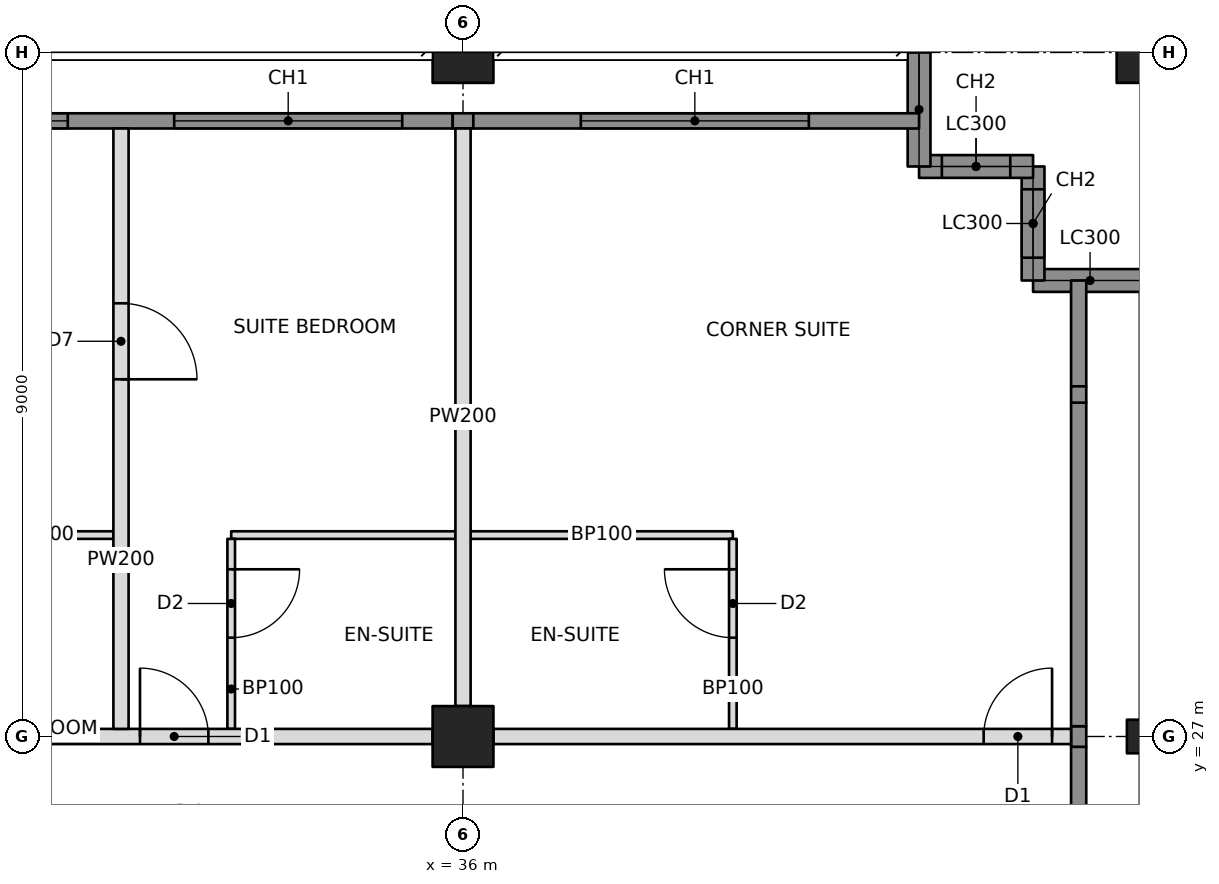
"""IFC4 building model, lengths in metres.
Left out: names, types, materials, properties, quantities, classifications, styles, units other than length and angle.
Written with IfcOpenShell. Run it as: python <this file> out.ifc"""

import sys

from ifc_helpers import new_model, si_unit, direction, frame, frame_2d, origin, origin_2d, place, context, subcontext, project, spatial, rectangle, hollow_rectangle, i_section, extrude, element, fill, save


model = new_model("IFC4")
c1 = context("Model", 3, precision=1e-05, world=origin(), true_north=direction((0.0, 1.0)))
c2 = subcontext(c1, "Body", "Model", "MODEL_VIEW")
j1 = project(units=[si_unit("LENGTHUNIT", "METRE"), si_unit("PLANEANGLEUNIT", "RADIAN")], contexts=[c1])
p1 = place(None, origin())
s1 = spatial("IfcSite", under=j1, at=p1, CompositionType="ELEMENT")
p2 = place(p1, origin())
s2 = spatial("IfcBuilding", under=s1, at=p2, CompositionType="ELEMENT")
p3 = place(p2, frame((0.0, 0.0, 148.6)))
s3 = spatial("IfcBuildingStorey", under=s2, at=p3, CompositionType="ELEMENT", Elevation=148.6)
p4 = place(p3, frame((36.0, 27.0, 0.0), z_axis=(0.0, 0.0, 1.0), x_axis=(1.0, 0.0, 0.0)))
e1 = element("IfcColumn", 1, at=p4, inside=s3, PredefinedType="COLUMN", context=c2, shape_type="SweptSolid", body=[
    extrude(hollow_rectangle(XDim=0.8, YDim=0.8, WallThickness=0.07, at=origin_2d()), origin(), (0.0, 0.0, 1.0), 3.4),
])
p5 = place(p3, frame((36.0, 36.0, 0.0), z_axis=(0.0, 0.0, 1.0), x_axis=(1.0, 0.0, 0.0)))
e2 = element("IfcColumn", 2, at=p5, inside=s3, PredefinedType="COLUMN", context=c2, shape_type="SweptSolid", body=[
    extrude(hollow_rectangle(XDim=0.8, YDim=0.8, WallThickness=0.06, at=origin_2d()), origin(), (0.0, 0.0, 1.0), 3.4),
])
p6 = place(p3, frame((45.0, 27.0, 0.0), z_axis=(0.0, 0.0, 1.0), x_axis=(0.0, 1.0, 0.0)))
e3 = element("IfcColumn", 3, at=p6, inside=s3, PredefinedType="COLUMN", context=c2, shape_type="SweptSolid", body=[
    extrude(i_section(OverallWidth=0.442, OverallDepth=0.531, WebThickness=0.066, FlangeThickness=0.106, at=origin_2d()), origin(), (0.0, 0.0, 1.0), 3.4),
])
p7 = place(p3, frame((45.0, 36.0, 0.0), z_axis=(0.0, 0.0, 1.0), x_axis=(1.0, 0.0, 0.0)))
e4 = element("IfcColumn", 4, at=p7, inside=s3, PredefinedType="COLUMN", context=c2, shape_type="SweptSolid", body=[
    extrude(hollow_rectangle(XDim=0.8, YDim=0.8, WallThickness=0.06, at=origin_2d()), origin(), (0.0, 0.0, 1.0), 3.4),
])
p8 = place(p3, frame((45.0, 33.0, 0.0), z_axis=(0.0, 0.0, 1.0), x_axis=(-1.0, 0.0, 0.0)))
e5 = element("IfcWall", 5, at=p8, inside=s3, PredefinedType="SOLIDWALL", context=c2, shape_type="SweptSolid", body=[
    extrude(rectangle(XDim=1.5, YDim=0.3, at=frame_2d((0.75, 0.0))), origin(), (0.0, 0.0, 1.0), 2.42),
])
p9 = place(p3, frame((43.5, 33.0, 0.0), z_axis=(0.0, 0.0, 1.0), x_axis=(0.0, 1.0, 0.0)))
e6 = element("IfcWall", 6, at=p9, inside=s3, PredefinedType="SOLIDWALL", context=c2, shape_type="SweptSolid", body=[
    extrude(rectangle(XDim=1.5, YDim=0.3, at=frame_2d((0.75, 0.0))), origin(), (0.0, 0.0, 1.0), 3.2),
])
p10 = place(p9, frame((0.3, 0.0, 0.6)))
e7 = element("IfcOpeningElement", 7, at=p10, cuts=e6, PredefinedType="OPENING", context=c2, shape_type="SweptSolid", body=[
    extrude(rectangle(XDim=0.9, YDim=2.2, at=frame_2d((0.45, 1.1))), frame((0.0, 0.16, 0.0), z_axis=(0.0, -1.0, 0.0), x_axis=(1.0, 0.0, 0.0)), (0.0, 0.0, 1.0), 0.32),
])
p11 = place(p3, frame((43.5, 34.5, 0.0), z_axis=(0.0, 0.0, 1.0), x_axis=(-1.0, 0.0, 0.0)))
e8 = element("IfcWall", 8, at=p11, inside=s3, PredefinedType="SOLIDWALL", context=c2, shape_type="SweptSolid", body=[
    extrude(rectangle(XDim=1.5, YDim=0.3, at=frame_2d((0.75, 0.0))), origin(), (0.0, 0.0, 1.0), 3.2),
])
p12 = place(p11, frame((0.3, 0.0, 0.6)))
e9 = element("IfcOpeningElement", 9, at=p12, cuts=e8, PredefinedType="OPENING", context=c2, shape_type="SweptSolid", body=[
    extrude(rectangle(XDim=0.9, YDim=2.2, at=frame_2d((0.45, 1.1))), frame((0.0, 0.16, 0.0), z_axis=(0.0, -1.0, 0.0), x_axis=(1.0, 0.0, 0.0)), (0.0, 0.0, 1.0), 0.32),
])
p13 = place(p3, frame((42.0, 34.5, 0.0), z_axis=(0.0, 0.0, 1.0), x_axis=(0.0, 1.0, 0.0)))
e10 = element("IfcWall", 10, at=p13, inside=s3, PredefinedType="SOLIDWALL", context=c2, shape_type="SweptSolid", body=[
    extrude(rectangle(XDim=1.5, YDim=0.3, at=frame_2d((0.75, 0.0))), origin(), (0.0, 0.0, 1.0), 2.42),
])
p14 = place(p3, frame((27.4, 27.0, 0.0), z_axis=(0.0, 0.0, 1.0), x_axis=(1.0, 0.0, 0.0)))
e11 = element("IfcWall", 11, at=p14, inside=s3, PredefinedType="PARTITIONING", context=c2, shape_type="SweptSolid", body=[
    extrude(rectangle(XDim=8.2, YDim=0.2, at=frame_2d((4.1, 0.0))), origin(), (0.0, 0.0, 1.0), 2.405),
])
p15 = place(p14, frame((4.35, 0.0, 0.0)))
e12 = element("IfcOpeningElement", 12, at=p15, cuts=e11, PredefinedType="OPENING", context=c2, shape_type="SweptSolid", body=[
    extrude(rectangle(XDim=0.9, YDim=2.1, at=frame_2d((0.45, 1.05))), frame((0.0, 0.11, 0.0), z_axis=(0.0, -1.0, 0.0), x_axis=(1.0, 0.0, 0.0)), (0.0, 0.0, 1.0), 0.22),
])
p16 = place(p3, frame((36.4, 27.0, 0.0), z_axis=(0.0, 0.0, 1.0), x_axis=(1.0, 0.0, 0.0)))
e13 = element("IfcWall", 13, at=p16, inside=s3, PredefinedType="PARTITIONING", context=c2, shape_type="SweptSolid", body=[
    extrude(rectangle(XDim=7.6, YDim=0.2, at=frame_2d((3.8, 0.0))), origin(), (0.0, 0.0, 1.0), 2.438),
])
p17 = place(p16, frame((6.45, 0.0, 0.0)))
e14 = element("IfcOpeningElement", 14, at=p17, cuts=e13, PredefinedType="OPENING", context=c2, shape_type="SweptSolid", body=[
    extrude(rectangle(XDim=0.9, YDim=2.1, at=frame_2d((0.45, 1.05))), frame((0.0, 0.11, 0.0), z_axis=(0.0, -1.0, 0.0), x_axis=(1.0, 0.0, 0.0)), (0.0, 0.0, 1.0), 0.22),
])
p18 = place(p3, frame((31.5, 27.1, 0.0), z_axis=(0.0, 0.0, 1.0), x_axis=(0.0, 1.0, 0.0)))
e15 = element("IfcWall", 15, at=p18, inside=s3, PredefinedType="PARTITIONING", context=c2, shape_type="SweptSolid", body=[
    extrude(rectangle(XDim=7.9, YDim=0.2, at=frame_2d((3.95, 0.0))), origin(), (0.0, 0.0, 1.0), 2.404),
])
p19 = place(p18, frame((4.6, 0.0, 0.0)))
e16 = element("IfcOpeningElement", 16, at=p19, cuts=e15, PredefinedType="OPENING", context=c2, shape_type="SweptSolid", body=[
    extrude(rectangle(XDim=1.0, YDim=2.1, at=frame_2d((0.5, 1.05))), frame((0.0, 0.11, 0.0), z_axis=(0.0, -1.0, 0.0), x_axis=(1.0, 0.0, 0.0)), (0.0, 0.0, 1.0), 0.22),
])
p20 = place(p3, frame((36.0, 27.4, 0.0), z_axis=(0.0, 0.0, 1.0), x_axis=(0.0, 1.0, 0.0)))
e17 = element("IfcWall", 17, at=p20, inside=s3, PredefinedType="PARTITIONING", context=c2, shape_type="SweptSolid", body=[
    extrude(rectangle(XDim=7.6, YDim=0.2, at=frame_2d((3.8, 0.0))), origin(), (0.0, 0.0, 1.0), 2.438),
])
p21 = place(p3, frame((29.55, 29.65, 0.0), z_axis=(0.0, 0.0, 1.0), x_axis=(1.0, 0.0, 0.0)))
e18 = element("IfcWall", 18, at=p21, inside=s3, PredefinedType="PARTITIONING", context=c2, shape_type="SweptSolid", body=[
    extrude(rectangle(XDim=1.85, YDim=0.1, at=frame_2d((0.925, 0.0))), origin(), (0.0, 0.0, 1.0), 3.2),
])
p22 = place(p3, frame((32.95, 29.65, 0.0), z_axis=(0.0, 0.0, 1.0), x_axis=(1.0, 0.0, 0.0)))
e19 = element("IfcWall", 19, at=p22, inside=s3, PredefinedType="PARTITIONING", context=c2, shape_type="SweptSolid", body=[
    extrude(rectangle(XDim=2.95, YDim=0.1, at=frame_2d((1.475, 0.0))), origin(), (0.0, 0.0, 1.0), 2.438),
])
p23 = place(p3, frame((32.95, 27.1, 0.0), z_axis=(0.0, 0.0, 1.0), x_axis=(0.0, 1.0, 0.0)))
e20 = element("IfcWall", 20, at=p23, inside=s3, PredefinedType="PARTITIONING", context=c2, shape_type="SweptSolid", body=[
    extrude(rectangle(XDim=2.5, YDim=0.1, at=frame_2d((1.25, 0.0))), origin(), (0.0, 0.0, 1.0), 2.404),
])
p24 = place(p23, frame((1.2, 0.0, 0.0)))
e21 = element("IfcOpeningElement", 21, at=p24, cuts=e20, PredefinedType="OPENING", context=c2, shape_type="SweptSolid", body=[
    extrude(rectangle(XDim=0.9, YDim=2.1, at=frame_2d((0.45, 1.05))), frame((0.0, 0.06, 0.0), z_axis=(0.0, -1.0, 0.0), x_axis=(1.0, 0.0, 0.0)), (0.0, 0.0, 1.0), 0.12),
])
p25 = place(p3, frame((36.1, 29.65, 0.0), z_axis=(0.0, 0.0, 1.0), x_axis=(1.0, 0.0, 0.0)))
e22 = element("IfcWall", 22, at=p25, inside=s3, PredefinedType="PARTITIONING", context=c2, shape_type="SweptSolid", body=[
    extrude(rectangle(XDim=3.45, YDim=0.1, at=frame_2d((1.725, 0.0))), origin(), (0.0, 0.0, 1.0), 2.438),
])
p26 = place(p3, frame((39.55, 27.1, 0.0), z_axis=(0.0, 0.0, 1.0), x_axis=(0.0, 1.0, 0.0)))
e23 = element("IfcWall", 23, at=p26, inside=s3, PredefinedType="PARTITIONING", context=c2, shape_type="SweptSolid", body=[
    extrude(rectangle(XDim=2.5, YDim=0.1, at=frame_2d((1.25, 0.0))), origin(), (0.0, 0.0, 1.0), 2.438),
])
p27 = place(p26, frame((1.2, 0.0, 0.0)))
e24 = element("IfcOpeningElement", 24, at=p27, cuts=e23, PredefinedType="OPENING", context=c2, shape_type="SweptSolid", body=[
    extrude(rectangle(XDim=0.9, YDim=2.1, at=frame_2d((0.45, 1.05))), frame((0.0, 0.06, 0.0), z_axis=(0.0, -1.0, 0.0), x_axis=(1.0, 0.0, 0.0)), (0.0, 0.0, 1.0), 0.12),
])
p28 = place(p3, frame((27.194, 35.1, 0.0), z_axis=(0.0, 0.0, 1.0), x_axis=(1.0, 0.0, 0.0)))
e25 = element("IfcWall", 25, at=p28, inside=s3, PredefinedType="SOLIDWALL", context=c2, shape_type="SweptSolid", body=[
    extrude(rectangle(XDim=8.671, YDim=0.2, at=frame_2d((4.335, 0.0))), origin(), (0.0, 0.0, 1.0), 3.2),
])
p29 = place(p28, frame((0.606, 0.0, 0.6)))
e26 = element("IfcOpeningElement", 26, at=p29, cuts=e25, PredefinedType="OPENING", context=c2, shape_type="SweptSolid", body=[
    extrude(rectangle(XDim=3.0, YDim=2.2, at=frame_2d((1.5, 1.1))), frame((0.0, 0.11, 0.0), z_axis=(0.0, -1.0, 0.0), x_axis=(1.0, 0.0, 0.0)), (0.0, 0.0, 1.0), 0.22),
])
p30 = place(p28, frame((5.006, 0.0, 0.6)))
e27 = element("IfcOpeningElement", 27, at=p30, cuts=e25, PredefinedType="OPENING", context=c2, shape_type="SweptSolid", body=[
    extrude(rectangle(XDim=3.0, YDim=2.2, at=frame_2d((1.5, 1.1))), frame((0.0, 0.11, 0.0), z_axis=(0.0, -1.0, 0.0), x_axis=(1.0, 0.0, 0.0)), (0.0, 0.0, 1.0), 0.22),
])
p31 = place(p3, frame((35.865, 35.1, 0.0), z_axis=(0.0, 0.0, 1.0), x_axis=(1.0, 0.0, 0.0)))
e28 = element("IfcWall", 28, at=p31, inside=s3, PredefinedType="SOLIDWALL", context=c2, shape_type="SweptSolid", body=[
    extrude(rectangle(XDim=0.271, YDim=0.2, at=frame_2d((0.135, 0.0))), origin(), (0.0, 0.0, 1.0), 2.438),
])
p32 = place(p3, frame((36.135, 35.1, 0.0), z_axis=(0.0, 0.0, 1.0), x_axis=(1.0, 0.0, 0.0)))
e29 = element("IfcWall", 29, at=p32, inside=s3, PredefinedType="SOLIDWALL", context=c2, shape_type="SweptSolid", body=[
    extrude(rectangle(XDim=5.865, YDim=0.2, at=frame_2d((2.932, 0.0))), origin(), (0.0, 0.0, 1.0), 3.2),
])
p33 = place(p32, frame((1.415, 0.0, 0.6)))
e30 = element("IfcOpeningElement", 30, at=p33, cuts=e29, PredefinedType="OPENING", context=c2, shape_type="SweptSolid", body=[
    extrude(rectangle(XDim=3.0, YDim=2.2, at=frame_2d((1.5, 1.1))), frame((0.0, 0.11, 0.0), z_axis=(0.0, -1.0, 0.0), x_axis=(1.0, 0.0, 0.0)), (0.0, 0.0, 1.0), 0.22),
])
p34 = place(p3, frame((44.1, 18.194, 0.0), z_axis=(0.0, 0.0, 1.0), x_axis=(0.0, 1.0, 0.0)))
e31 = element("IfcWall", 31, at=p34, inside=s3, PredefinedType="SOLIDWALL", context=c2, shape_type="SweptSolid", body=[
    extrude(rectangle(XDim=8.671, YDim=0.2, at=frame_2d((4.335, 0.0))), origin(), (0.0, 0.0, 1.0), 3.2),
])
p35 = place(p34, frame((0.156, 0.0, 0.6)))
e32 = element("IfcOpeningElement", 32, at=p35, cuts=e31, PredefinedType="OPENING", context=c2, shape_type="SweptSolid", body=[
    extrude(rectangle(XDim=3.0, YDim=2.2, at=frame_2d((1.5, 1.1))), frame((0.0, 0.11, 0.0), z_axis=(0.0, -1.0, 0.0), x_axis=(1.0, 0.0, 0.0)), (0.0, 0.0, 1.0), 0.22),
])
p36 = place(p34, frame((3.656, 0.0, 0.6)))
e33 = element("IfcOpeningElement", 33, at=p36, cuts=e31, PredefinedType="OPENING", context=c2, shape_type="SweptSolid", body=[
    extrude(rectangle(XDim=3.0, YDim=2.2, at=frame_2d((1.5, 1.1))), frame((0.0, 0.11, 0.0), z_axis=(0.0, -1.0, 0.0), x_axis=(1.0, 0.0, 0.0)), (0.0, 0.0, 1.0), 0.22),
])
p37 = place(p3, frame((44.1, 26.865, 0.0), z_axis=(0.0, 0.0, 1.0), x_axis=(0.0, 1.0, 0.0)))
e34 = element("IfcWall", 34, at=p37, inside=s3, PredefinedType="SOLIDWALL", context=c2, shape_type="SweptSolid", body=[
    extrude(rectangle(XDim=0.271, YDim=0.2, at=frame_2d((0.135, 0.0))), origin(), (0.0, 0.0, 1.0), 2.438),
])
p38 = place(p3, frame((44.1, 27.135, 0.0), z_axis=(0.0, 0.0, 1.0), x_axis=(0.0, 1.0, 0.0)))
e35 = element("IfcWall", 35, at=p38, inside=s3, PredefinedType="SOLIDWALL", context=c2, shape_type="SweptSolid", body=[
    extrude(rectangle(XDim=4.257, YDim=0.2, at=frame_2d((2.129, 0.0))), origin(), (0.0, 0.0, 1.0), 3.2),
])
p39 = place(p3, frame((44.1, 31.393, 0.0), z_axis=(0.0, 0.0, 1.0), x_axis=(0.0, 1.0, 0.0)))
e36 = element("IfcWall", 36, at=p39, inside=s3, PredefinedType="SOLIDWALL", context=c2, shape_type="SweptSolid", body=[
    extrude(rectangle(XDim=0.215, YDim=0.2, at=frame_2d((0.107, 0.0))), origin(), (0.0, 0.0, 1.0), 2.661),
])
p40 = place(p3, frame((44.1, 31.607, 0.0), z_axis=(0.0, 0.0, 1.0), x_axis=(0.0, 1.0, 0.0)))
e37 = element("IfcWall", 37, at=p40, inside=s3, PredefinedType="SOLIDWALL", context=c2, shape_type="SweptSolid", body=[
    extrude(rectangle(XDim=1.393, YDim=0.2, at=frame_2d((0.696, 0.0))), origin(), (0.0, 0.0, 1.0), 3.2),
])
p41 = place(p10, origin())
e38 = element("IfcWindow", 38, at=p41, inside=s3, PartitioningType="SINGLE_PANEL", PredefinedType="WINDOW", context=c2, shape_type="SweptSolid", body=[
    extrude(rectangle(XDim=0.9, YDim=2.2, at=frame_2d((0.45, 1.1))), frame((0.0, 0.03, 0.0), z_axis=(0.0, -1.0, 0.0), x_axis=(1.0, 0.0, 0.0)), (0.0, 0.0, 1.0), 0.06),
])
fill(e7, e38)
p42 = place(p12, origin())
e39 = element("IfcWindow", 39, at=p42, inside=s3, PartitioningType="SINGLE_PANEL", PredefinedType="WINDOW", context=c2, shape_type="SweptSolid", body=[
    extrude(rectangle(XDim=0.9, YDim=2.2, at=frame_2d((0.45, 1.1))), frame((0.0, 0.03, 0.0), z_axis=(0.0, -1.0, 0.0), x_axis=(1.0, 0.0, 0.0)), (0.0, 0.0, 1.0), 0.06),
])
fill(e9, e39)
p43 = place(p29, origin())
e40 = element("IfcWindow", 40, at=p43, inside=s3, PartitioningType="TRIPLE_PANEL_VERTICAL", PredefinedType="WINDOW", context=c2, shape_type="SweptSolid", body=[
    extrude(rectangle(XDim=3.0, YDim=2.2, at=frame_2d((1.5, 1.1))), frame((0.0, 0.03, 0.0), z_axis=(0.0, -1.0, 0.0), x_axis=(1.0, 0.0, 0.0)), (0.0, 0.0, 1.0), 0.06),
])
fill(e26, e40)
p44 = place(p30, origin())
e41 = element("IfcWindow", 41, at=p44, inside=s3, PartitioningType="TRIPLE_PANEL_VERTICAL", PredefinedType="WINDOW", context=c2, shape_type="SweptSolid", body=[
    extrude(rectangle(XDim=3.0, YDim=2.2, at=frame_2d((1.5, 1.1))), frame((0.0, 0.03, 0.0), z_axis=(0.0, -1.0, 0.0), x_axis=(1.0, 0.0, 0.0)), (0.0, 0.0, 1.0), 0.06),
])
fill(e27, e41)
p45 = place(p33, origin())
e42 = element("IfcWindow", 42, at=p45, inside=s3, PartitioningType="TRIPLE_PANEL_VERTICAL", PredefinedType="WINDOW", context=c2, shape_type="SweptSolid", body=[
    extrude(rectangle(XDim=3.0, YDim=2.2, at=frame_2d((1.5, 1.1))), frame((0.0, 0.03, 0.0), z_axis=(0.0, -1.0, 0.0), x_axis=(1.0, 0.0, 0.0)), (0.0, 0.0, 1.0), 0.06),
])
fill(e30, e42)
p46 = place(p19, frame((1.0, 0.0, 0.0), z_axis=(0.0, 0.0, 1.0), x_axis=(-1.0, 0.0, 0.0)))
e43 = element("IfcDoor", 43, at=p46, inside=s3, OperationType="SINGLE_SWING_RIGHT", PredefinedType="DOOR", context=c2, shape_type="SweptSolid", body=[
    extrude(rectangle(XDim=1.0, YDim=2.1, at=frame_2d((0.5, 1.05))), frame((0.0, 0.025, 0.0), z_axis=(0.0, -1.0, 0.0), x_axis=(1.0, 0.0, 0.0)), (0.0, 0.0, 1.0), 0.05),
])
fill(e16, e43)
p47 = place(p24, frame((0.9, 0.0, 0.0), z_axis=(0.0, 0.0, 1.0), x_axis=(-1.0, 0.0, 0.0)))
e44 = element("IfcDoor", 44, at=p47, inside=s3, OperationType="SINGLE_SWING_LEFT", PredefinedType="DOOR", context=c2, shape_type="SweptSolid", body=[
    extrude(rectangle(XDim=0.9, YDim=2.1, at=frame_2d((0.45, 1.05))), frame((0.0, 0.025, 0.0), z_axis=(0.0, -1.0, 0.0), x_axis=(1.0, 0.0, 0.0)), (0.0, 0.0, 1.0), 0.05),
])
fill(e21, e44)
p48 = place(p15, origin())
e45 = element("IfcDoor", 45, at=p48, inside=s3, OperationType="SINGLE_SWING_LEFT", PredefinedType="DOOR", context=c2, shape_type="SweptSolid", body=[
    extrude(rectangle(XDim=0.9, YDim=2.1, at=frame_2d((0.45, 1.05))), frame((0.0, 0.025, 0.0), z_axis=(0.0, -1.0, 0.0), x_axis=(1.0, 0.0, 0.0)), (0.0, 0.0, 1.0), 0.05),
])
fill(e12, e45)
p49 = place(p27, origin())
e46 = element("IfcDoor", 46, at=p49, inside=s3, OperationType="SINGLE_SWING_RIGHT", PredefinedType="DOOR", context=c2, shape_type="SweptSolid", body=[
    extrude(rectangle(XDim=0.9, YDim=2.1, at=frame_2d((0.45, 1.05))), frame((0.0, 0.025, 0.0), z_axis=(0.0, -1.0, 0.0), x_axis=(1.0, 0.0, 0.0)), (0.0, 0.0, 1.0), 0.05),
])
fill(e24, e46)
p50 = place(p17, origin())
e47 = element("IfcDoor", 47, at=p50, inside=s3, OperationType="SINGLE_SWING_RIGHT", PredefinedType="DOOR", context=c2, shape_type="SweptSolid", body=[
    extrude(rectangle(XDim=0.9, YDim=2.1, at=frame_2d((0.45, 1.05))), frame((0.0, 0.025, 0.0), z_axis=(0.0, -1.0, 0.0), x_axis=(1.0, 0.0, 0.0)), (0.0, 0.0, 1.0), 0.05),
])
fill(e14, e47)
save(model, sys.argv[1])
